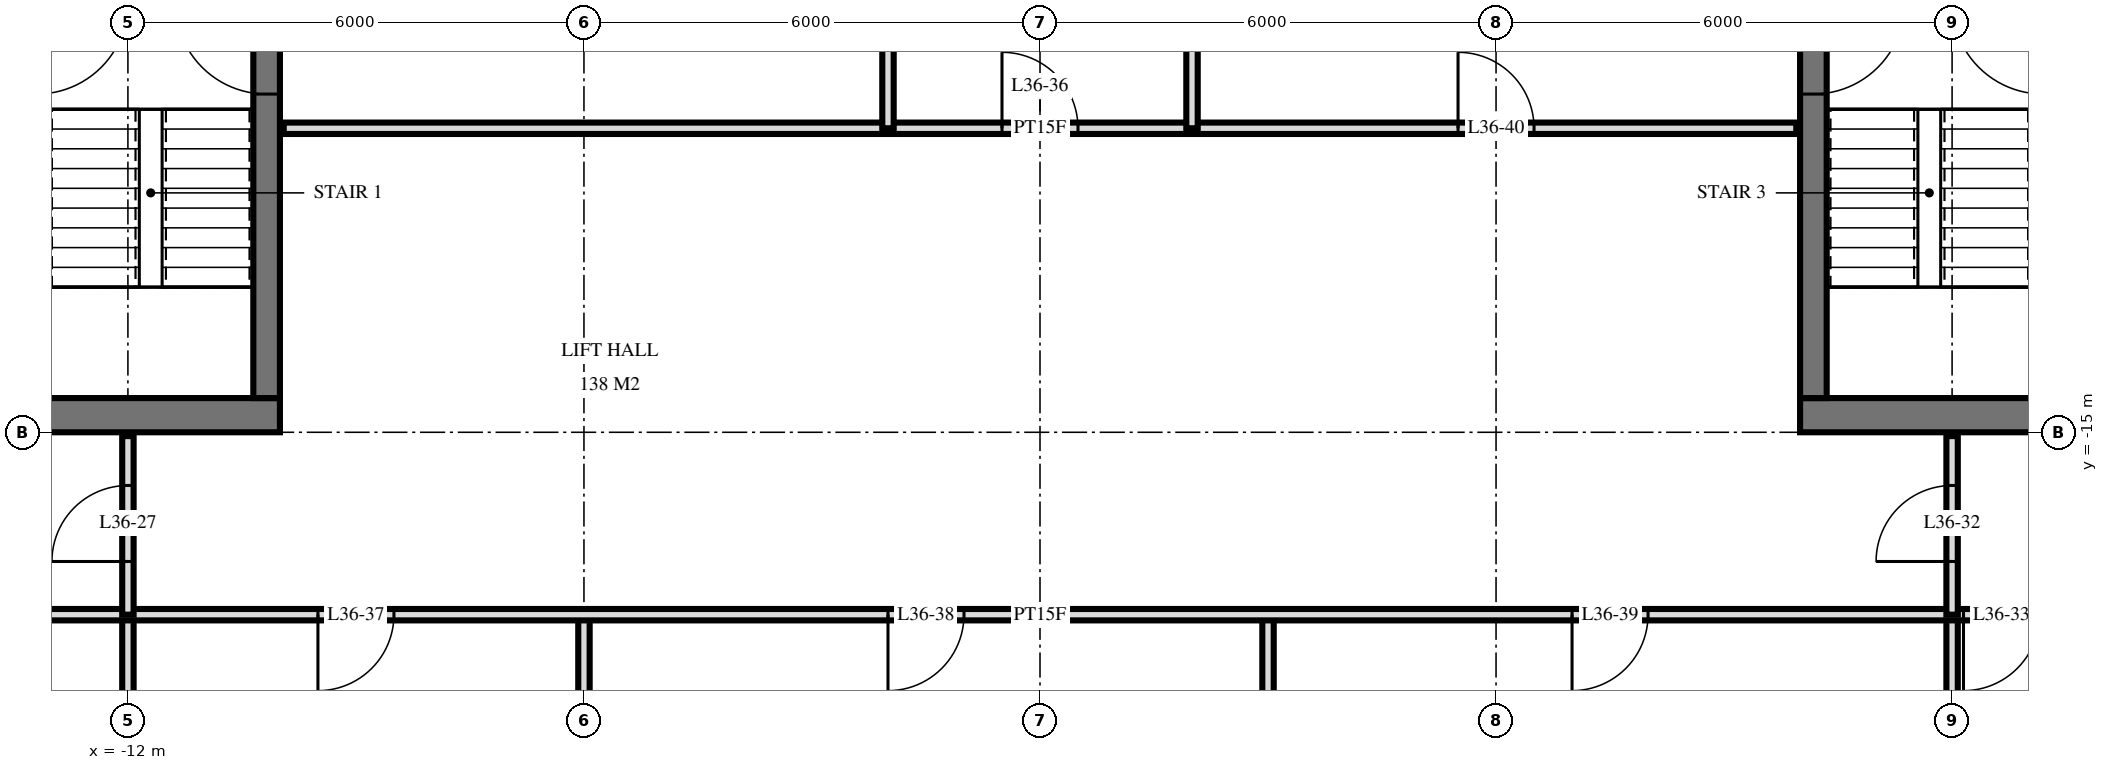
"""IFC4 building model, lengths in metres.
Left out: names, types, materials, properties, quantities, classifications, styles, units other than length and angle.
Written with IfcOpenShell. Run it as: python <this file> out.ifc"""

import sys

from ifc_helpers import new_model, si_unit, direction, frame, frame_2d, origin, place, context, subcontext, project, spatial, rectangle, extrude, element, fill, save


model = new_model("IFC4")
c1 = context("Model", 3, precision=1e-05, world=origin(), true_north=direction((0.0, 1.0)))
c2 = subcontext(c1, "Body", "Model", "MODEL_VIEW")
j1 = project(units=[si_unit("LENGTHUNIT", "METRE"), si_unit("PLANEANGLEUNIT", "RADIAN")], contexts=[c1])
p1 = place(None, origin())
s1 = spatial("IfcSite", under=j1, at=p1, CompositionType="ELEMENT")
p2 = place(p1, origin())
s2 = spatial("IfcBuilding", under=s1, at=p2, CompositionType="ELEMENT")
p3 = place(p2, frame((0.0, 0.0, 141.6)))
s3 = spatial("IfcBuildingStorey", under=s2, at=p3, CompositionType="ELEMENT", Elevation=141.6)
p4 = place(p3, frame((-24.5, -14.775, 0.0), z_axis=(0.0, 0.0, 1.0), x_axis=(1.0, 0.0, 0.0)))
e1 = element("IfcWall", 1, at=p4, inside=s3, PredefinedType="SHEAR", context=c2, shape_type="SweptSolid", body=[
    extrude(rectangle(XDim=14.5, YDim=0.45, at=frame_2d((7.25, 0.0))), origin(), (0.0, 0.0, 1.0), 3.6),
])
p5 = place(p4, frame((6.2, 0.0, 0.0)))
e2 = element("IfcOpeningElement", 2, at=p5, cuts=e1, PredefinedType="OPENING", context=c2, shape_type="SweptSolid", body=[
    extrude(rectangle(XDim=1.2, YDim=2.1, at=frame_2d((0.6, 1.05))), frame((0.0, 0.235, 0.0), z_axis=(0.0, -1.0, 0.0), x_axis=(1.0, 0.0, 0.0)), (0.0, 0.0, 1.0), 0.47),
])
p6 = place(p4, frame((9.25, 0.0, 0.0)))
e3 = element("IfcOpeningElement", 3, at=p6, cuts=e1, PredefinedType="OPENING", context=c2, shape_type="SweptSolid", body=[
    extrude(rectangle(XDim=1.1, YDim=2.1, at=frame_2d((0.55, 1.05))), frame((0.0, 0.235, 0.0), z_axis=(0.0, -1.0, 0.0), x_axis=(1.0, 0.0, 0.0)), (0.0, 0.0, 1.0), 0.47),
])
p7 = place(p4, frame((3.5, 0.0, 0.0)))
e4 = element("IfcOpeningElement", 4, at=p7, cuts=e1, PredefinedType="OPENING", context=c2, shape_type="SweptSolid", body=[
    extrude(rectangle(XDim=0.9, YDim=2.1, at=frame_2d((0.45, 1.05))), frame((0.0, 0.235, 0.0), z_axis=(0.0, -1.0, 0.0), x_axis=(1.0, 0.0, 0.0)), (0.0, 0.0, 1.0), 0.47),
])
p8 = place(p4, frame((1.05, 0.0, 0.0)))
e5 = element("IfcOpeningElement", 5, at=p8, cuts=e1, PredefinedType="OPENING", context=c2, shape_type="SweptSolid", body=[
    extrude(rectangle(XDim=1.0, YDim=2.1, at=frame_2d((0.5, 1.05))), frame((0.0, 0.235, 0.0), z_axis=(0.0, -1.0, 0.0), x_axis=(1.0, 0.0, 0.0)), (0.0, 0.0, 1.0), 0.47),
])
p9 = place(p3, frame((-10.175, -14.55, 0.0), z_axis=(0.0, 0.0, 1.0), x_axis=(0.0, 1.0, 0.0)))
e6 = element("IfcWall", 6, at=p9, inside=s3, PredefinedType="SHEAR", context=c2, shape_type="SweptSolid", body=[
    extrude(rectangle(XDim=14.1, YDim=0.35, at=frame_2d((7.05, 0.0))), origin(), (0.0, 0.0, 1.0), 3.6),
])
p10 = place(p9, frame((8.4, 0.0, 0.0)))
e7 = element("IfcOpeningElement", 7, at=p10, cuts=e6, PredefinedType="OPENING", context=c2, shape_type="SweptSolid", body=[
    extrude(rectangle(XDim=1.4, YDim=2.4, at=frame_2d((0.7, 1.2))), frame((0.0, 0.185, 0.0), z_axis=(0.0, -1.0, 0.0), x_axis=(1.0, 0.0, 0.0)), (0.0, 0.0, 1.0), 0.37),
])
p11 = place(p9, frame((10.0, 0.0, 0.0)))
e8 = element("IfcOpeningElement", 8, at=p11, cuts=e6, PredefinedType="OPENING", context=c2, shape_type="SweptSolid", body=[
    extrude(rectangle(XDim=1.4, YDim=2.4, at=frame_2d((0.7, 1.2))), frame((0.0, 0.185, 0.0), z_axis=(0.0, -1.0, 0.0), x_axis=(1.0, 0.0, 0.0)), (0.0, 0.0, 1.0), 0.37),
])
p12 = place(p9, frame((4.0, 0.0, 0.0)))
e9 = element("IfcOpeningElement", 9, at=p12, cuts=e6, PredefinedType="OPENING", context=c2, shape_type="SweptSolid", body=[
    extrude(rectangle(XDim=1.2, YDim=2.1, at=frame_2d((0.6, 1.05))), frame((0.0, 0.185, 0.0), z_axis=(0.0, -1.0, 0.0), x_axis=(1.0, 0.0, 0.0)), (0.0, 0.0, 1.0), 0.37),
])
p13 = place(p3, frame((10.0, -14.775, 0.0), z_axis=(0.0, 0.0, 1.0), x_axis=(1.0, 0.0, 0.0)))
e10 = element("IfcWall", 10, at=p13, inside=s3, PredefinedType="SHEAR", context=c2, shape_type="SweptSolid", body=[
    extrude(rectangle(XDim=14.5, YDim=0.45, at=frame_2d((7.25, 0.0))), origin(), (0.0, 0.0, 1.0), 3.6),
])
p14 = place(p13, frame((7.1, 0.0, 0.0)))
e11 = element("IfcOpeningElement", 11, at=p14, cuts=e10, PredefinedType="OPENING", context=c2, shape_type="SweptSolid", body=[
    extrude(rectangle(XDim=1.2, YDim=2.1, at=frame_2d((0.6, 1.05))), frame((0.0, 0.235, 0.0), z_axis=(0.0, -1.0, 0.0), x_axis=(1.0, 0.0, 0.0)), (0.0, 0.0, 1.0), 0.47),
])
p15 = place(p13, frame((4.15, 0.0, 0.0)))
e12 = element("IfcOpeningElement", 12, at=p15, cuts=e10, PredefinedType="OPENING", context=c2, shape_type="SweptSolid", body=[
    extrude(rectangle(XDim=1.1, YDim=2.1, at=frame_2d((0.55, 1.05))), frame((0.0, 0.235, 0.0), z_axis=(0.0, -1.0, 0.0), x_axis=(1.0, 0.0, 0.0)), (0.0, 0.0, 1.0), 0.47),
])
p16 = place(p13, frame((10.1, 0.0, 0.0)))
e13 = element("IfcOpeningElement", 13, at=p16, cuts=e10, PredefinedType="OPENING", context=c2, shape_type="SweptSolid", body=[
    extrude(rectangle(XDim=0.9, YDim=2.1, at=frame_2d((0.45, 1.05))), frame((0.0, 0.235, 0.0), z_axis=(0.0, -1.0, 0.0), x_axis=(1.0, 0.0, 0.0)), (0.0, 0.0, 1.0), 0.47),
])
p17 = place(p13, frame((12.45, 0.0, 0.0)))
e14 = element("IfcOpeningElement", 14, at=p17, cuts=e10, PredefinedType="OPENING", context=c2, shape_type="SweptSolid", body=[
    extrude(rectangle(XDim=1.0, YDim=2.1, at=frame_2d((0.5, 1.05))), frame((0.0, 0.235, 0.0), z_axis=(0.0, -1.0, 0.0), x_axis=(1.0, 0.0, 0.0)), (0.0, 0.0, 1.0), 0.47),
])
p18 = place(p3, frame((10.175, -14.55, 0.0), z_axis=(0.0, 0.0, 1.0), x_axis=(0.0, 1.0, 0.0)))
e15 = element("IfcWall", 15, at=p18, inside=s3, PredefinedType="SHEAR", context=c2, shape_type="SweptSolid", body=[
    extrude(rectangle(XDim=14.1, YDim=0.35, at=frame_2d((7.05, 0.0))), origin(), (0.0, 0.0, 1.0), 3.6),
])
p19 = place(p18, frame((8.4, 0.0, 0.0)))
e16 = element("IfcOpeningElement", 16, at=p19, cuts=e15, PredefinedType="OPENING", context=c2, shape_type="SweptSolid", body=[
    extrude(rectangle(XDim=1.4, YDim=2.4, at=frame_2d((0.7, 1.2))), frame((0.0, 0.185, 0.0), z_axis=(0.0, -1.0, 0.0), x_axis=(1.0, 0.0, 0.0)), (0.0, 0.0, 1.0), 0.37),
])
p20 = place(p18, frame((10.0, 0.0, 0.0)))
e17 = element("IfcOpeningElement", 17, at=p20, cuts=e15, PredefinedType="OPENING", context=c2, shape_type="SweptSolid", body=[
    extrude(rectangle(XDim=1.4, YDim=2.4, at=frame_2d((0.7, 1.2))), frame((0.0, 0.185, 0.0), z_axis=(0.0, -1.0, 0.0), x_axis=(1.0, 0.0, 0.0)), (0.0, 0.0, 1.0), 0.37),
])
p21 = place(p18, frame((4.0, 0.0, 0.0)))
e18 = element("IfcOpeningElement", 18, at=p21, cuts=e15, PredefinedType="OPENING", context=c2, shape_type="SweptSolid", body=[
    extrude(rectangle(XDim=1.2, YDim=2.1, at=frame_2d((0.6, 1.05))), frame((0.0, 0.185, 0.0), z_axis=(0.0, -1.0, 0.0), x_axis=(1.0, 0.0, 0.0)), (0.0, 0.0, 1.0), 0.37),
])
p22 = place(p3, frame((12.0, -17.4, 0.0), z_axis=(0.0, 0.0, 1.0), x_axis=(0.0, 1.0, 0.0)))
e19 = element("IfcWall", 19, at=p22, inside=s3, PredefinedType="PARTITIONING", context=c2, shape_type="SweptSolid", body=[
    extrude(rectangle(XDim=2.35, YDim=0.15, at=frame_2d((1.175, 0.0))), origin(), (0.0, 0.0, 1.0), 3.32),
])
p23 = place(p22, frame((0.7, 0.0, 0.0)))
e20 = element("IfcOpeningElement", 20, at=p23, cuts=e19, PredefinedType="OPENING", context=c2, shape_type="SweptSolid", body=[
    extrude(rectangle(XDim=1.0, YDim=2.1, at=frame_2d((0.5, 1.05))), frame((0.0, 0.085, 0.0), z_axis=(0.0, -1.0, 0.0), x_axis=(1.0, 0.0, 0.0)), (0.0, 0.0, 1.0), 0.17),
])
for number, where, z_axis, x_axis in (
    (21, (12.0, -33.62, 0.0), (0.0, 0.0, 1.0), (0.0, 1.0, 0.0)),
    (22, (3.0, -33.62, 0.0), (0.0, 0.0, 1.0), (0.0, 1.0, 0.0)),
):
    element("IfcWall", number, at=place(p3, frame(where, z_axis=z_axis, x_axis=x_axis)), inside=s3, PredefinedType="PARTITIONING", context=c2, shape_type="SweptSolid", body=[
        extrude(rectangle(XDim=16.22, YDim=0.15, at=frame_2d((8.11, 0.0))), origin(), (0.0, 0.0, 1.0), 3.32),
    ])
for number, where, z_axis, x_axis in (
    (23, (2.0, -11.0, 0.0), (0.0, 0.0, 1.0), (0.0, 1.0, 0.0)),
    (24, (-2.0, -11.0, 0.0), (0.0, 0.0, 1.0), (0.0, 1.0, 0.0)),
):
    element("IfcWall", number, at=place(p3, frame(where, z_axis=z_axis, x_axis=x_axis)), inside=s3, PredefinedType="PARTITIONING", context=c2, shape_type="SweptSolid", body=[
        extrude(rectangle(XDim=4.0, YDim=0.15, at=frame_2d((2.0, 0.0))), origin(), (0.0, 0.0, 1.0), 3.32),
    ])
p24 = place(p3, frame((-6.0, -33.62, 0.0), z_axis=(0.0, 0.0, 1.0), x_axis=(0.0, 1.0, 0.0)))
e25 = element("IfcWall", 25, at=p24, inside=s3, PredefinedType="PARTITIONING", context=c2, shape_type="SweptSolid", body=[
    extrude(rectangle(XDim=16.22, YDim=0.15, at=frame_2d((8.11, 0.0))), origin(), (0.0, 0.0, 1.0), 3.32),
])
p25 = place(p3, frame((-12.0, -17.4, 0.0), z_axis=(0.0, 0.0, 1.0), x_axis=(0.0, 1.0, 0.0)))
e26 = element("IfcWall", 26, at=p25, inside=s3, PredefinedType="PARTITIONING", context=c2, shape_type="SweptSolid", body=[
    extrude(rectangle(XDim=2.35, YDim=0.15, at=frame_2d((1.175, 0.0))), origin(), (0.0, 0.0, 1.0), 3.32),
])
p26 = place(p25, frame((0.7, 0.0, 0.0)))
e27 = element("IfcOpeningElement", 27, at=p26, cuts=e26, PredefinedType="OPENING", context=c2, shape_type="SweptSolid", body=[
    extrude(rectangle(XDim=1.0, YDim=2.1, at=frame_2d((0.5, 1.05))), frame((0.0, 0.085, 0.0), z_axis=(0.0, -1.0, 0.0), x_axis=(1.0, 0.0, 0.0)), (0.0, 0.0, 1.0), 0.17),
])
p27 = place(p3, frame((-12.0, -33.62, 0.0), z_axis=(0.0, 0.0, 1.0), x_axis=(0.0, 1.0, 0.0)))
e28 = element("IfcWall", 28, at=p27, inside=s3, PredefinedType="PARTITIONING", context=c2, shape_type="SweptSolid", body=[
    extrude(rectangle(XDim=16.22, YDim=0.15, at=frame_2d((8.11, 0.0))), origin(), (0.0, 0.0, 1.0), 3.32),
])
p28 = place(p3, frame((-28.02, -17.4, 0.0), z_axis=(0.0, 0.0, 1.0), x_axis=(1.0, 0.0, 0.0)))
e29 = element("IfcWall", 29, at=p28, inside=s3, PredefinedType="PARTITIONING", context=c2, shape_type="SweptSolid", body=[
    extrude(rectangle(XDim=56.04, YDim=0.15, at=frame_2d((28.02, 0.0))), origin(), (0.0, 0.0, 1.0), 3.32),
])
p29 = place(p28, frame((13.17, 0.0, 0.0)))
e30 = element("IfcOpeningElement", 30, at=p29, cuts=e29, PredefinedType="OPENING", context=c2, shape_type="SweptSolid", body=[
    extrude(rectangle(XDim=1.0, YDim=2.1, at=frame_2d((0.5, 1.05))), frame((0.0, 0.085, 0.0), z_axis=(0.0, -1.0, 0.0), x_axis=(1.0, 0.0, 0.0)), (0.0, 0.0, 1.0), 0.17),
])
p30 = place(p28, frame((11.87, 0.0, 0.0)))
e31 = element("IfcOpeningElement", 31, at=p30, cuts=e29, PredefinedType="OPENING", context=c2, shape_type="SweptSolid", body=[
    extrude(rectangle(XDim=1.0, YDim=2.1, at=frame_2d((0.5, 1.05))), frame((0.0, 0.085, 0.0), z_axis=(0.0, -1.0, 0.0), x_axis=(1.0, 0.0, 0.0)), (0.0, 0.0, 1.0), 0.17),
])
p31 = place(p28, frame((2.32, 0.0, 0.0)))
e32 = element("IfcOpeningElement", 32, at=p31, cuts=e29, PredefinedType="OPENING", context=c2, shape_type="SweptSolid", body=[
    extrude(rectangle(XDim=1.0, YDim=2.1, at=frame_2d((0.5, 1.05))), frame((0.0, 0.085, 0.0), z_axis=(0.0, -1.0, 0.0), x_axis=(1.0, 0.0, 0.0)), (0.0, 0.0, 1.0), 0.17),
])
p32 = place(p28, frame((40.17, 0.0, 0.0)))
e33 = element("IfcOpeningElement", 33, at=p32, cuts=e29, PredefinedType="OPENING", context=c2, shape_type="SweptSolid", body=[
    extrude(rectangle(XDim=1.0, YDim=2.1, at=frame_2d((0.5, 1.05))), frame((0.0, 0.085, 0.0), z_axis=(0.0, -1.0, 0.0), x_axis=(1.0, 0.0, 0.0)), (0.0, 0.0, 1.0), 0.17),
])
p33 = place(p28, frame((51.22, 0.0, 0.0)))
e34 = element("IfcOpeningElement", 34, at=p33, cuts=e29, PredefinedType="OPENING", context=c2, shape_type="SweptSolid", body=[
    extrude(rectangle(XDim=1.0, YDim=2.1, at=frame_2d((0.5, 1.05))), frame((0.0, 0.085, 0.0), z_axis=(0.0, -1.0, 0.0), x_axis=(1.0, 0.0, 0.0)), (0.0, 0.0, 1.0), 0.17),
])
p34 = place(p28, frame((18.52, 0.0, 0.0)))
e35 = element("IfcOpeningElement", 35, at=p34, cuts=e29, PredefinedType="OPENING", context=c2, shape_type="SweptSolid", body=[
    extrude(rectangle(XDim=1.0, YDim=2.1, at=frame_2d((0.5, 1.05))), frame((0.0, 0.085, 0.0), z_axis=(0.0, -1.0, 0.0), x_axis=(1.0, 0.0, 0.0)), (0.0, 0.0, 1.0), 0.17),
])
p35 = place(p28, frame((26.02, 0.0, 0.0)))
e36 = element("IfcOpeningElement", 36, at=p35, cuts=e29, PredefinedType="OPENING", context=c2, shape_type="SweptSolid", body=[
    extrude(rectangle(XDim=1.0, YDim=2.1, at=frame_2d((0.5, 1.05))), frame((0.0, 0.085, 0.0), z_axis=(0.0, -1.0, 0.0), x_axis=(1.0, 0.0, 0.0)), (0.0, 0.0, 1.0), 0.17),
])
p36 = place(p28, frame((35.02, 0.0, 0.0)))
e37 = element("IfcOpeningElement", 37, at=p36, cuts=e29, PredefinedType="OPENING", context=c2, shape_type="SweptSolid", body=[
    extrude(rectangle(XDim=1.0, YDim=2.1, at=frame_2d((0.5, 1.05))), frame((0.0, 0.085, 0.0), z_axis=(0.0, -1.0, 0.0), x_axis=(1.0, 0.0, 0.0)), (0.0, 0.0, 1.0), 0.17),
])
p37 = place(p3, frame((-9.95, -11.0, 0.0), z_axis=(0.0, 0.0, 1.0), x_axis=(1.0, 0.0, 0.0)))
e38 = element("IfcWall", 38, at=p37, inside=s3, PredefinedType="PARTITIONING", context=c2, shape_type="SweptSolid", body=[
    extrude(rectangle(XDim=19.9, YDim=0.15, at=frame_2d((9.95, 0.0))), origin(), (0.0, 0.0, 1.0), 3.32),
])
p38 = place(p37, frame((9.45, 0.0, 0.0)))
e39 = element("IfcOpeningElement", 39, at=p38, cuts=e38, PredefinedType="OPENING", context=c2, shape_type="SweptSolid", body=[
    extrude(rectangle(XDim=1.0, YDim=2.1, at=frame_2d((0.5, 1.05))), frame((0.0, 0.085, 0.0), z_axis=(0.0, -1.0, 0.0), x_axis=(1.0, 0.0, 0.0)), (0.0, 0.0, 1.0), 0.17),
])
p39 = place(p37, frame((15.45, 0.0, 0.0)))
e40 = element("IfcOpeningElement", 40, at=p39, cuts=e38, PredefinedType="OPENING", context=c2, shape_type="SweptSolid", body=[
    extrude(rectangle(XDim=1.0, YDim=2.1, at=frame_2d((0.5, 1.05))), frame((0.0, 0.085, 0.0), z_axis=(0.0, -1.0, 0.0), x_axis=(1.0, 0.0, 0.0)), (0.0, 0.0, 1.0), 0.17),
])
p40 = place(p12, origin())
e41 = element("IfcDoor", 41, at=p40, inside=s3, OperationType="SINGLE_SWING_LEFT", PredefinedType="DOOR", context=c2, shape_type="SweptSolid", body=[
    extrude(rectangle(XDim=1.2, YDim=2.1, at=frame_2d((0.6, 1.05))), frame((0.0, 0.025, 0.0), z_axis=(0.0, -1.0, 0.0), x_axis=(1.0, 0.0, 0.0)), (0.0, 0.0, 1.0), 0.05),
])
fill(e9, e41)
p41 = place(p21, frame((0.6, 0.0, 0.0), z_axis=(0.0, 0.0, 1.0), x_axis=(-1.0, 0.0, 0.0)))
e42 = element("IfcDoor", 42, at=p41, inside=s3, OperationType="SINGLE_SWING_RIGHT", PredefinedType="DOOR", context=c2, shape_type="SweptSolid", body=[
    extrude(rectangle(XDim=1.2, YDim=2.1, at=frame_2d((0.0, 1.05))), frame((0.0, -0.025, 0.0), z_axis=(0.0, 1.0, 0.0), x_axis=(-1.0, 0.0, 0.0)), (0.0, 0.0, 1.0), 0.05),
])
fill(e18, e42)
p42 = place(p26, origin())
e43 = element("IfcDoor", 43, at=p42, inside=s3, OperationType="SINGLE_SWING_RIGHT", PredefinedType="DOOR", context=c2, shape_type="SweptSolid", body=[
    extrude(rectangle(XDim=1.0, YDim=2.1, at=frame_2d((0.5, 1.05))), frame((0.0, 0.025, 0.0), z_axis=(0.0, -1.0, 0.0), x_axis=(1.0, 0.0, 0.0)), (0.0, 0.0, 1.0), 0.05),
])
fill(e27, e43)
p43 = place(p23, origin())
e44 = element("IfcDoor", 44, at=p43, inside=s3, OperationType="SINGLE_SWING_RIGHT", PredefinedType="DOOR", context=c2, shape_type="SweptSolid", body=[
    extrude(rectangle(XDim=1.0, YDim=2.1, at=frame_2d((0.5, 1.05))), frame((0.0, 0.025, 0.0), z_axis=(0.0, -1.0, 0.0), x_axis=(1.0, 0.0, 0.0)), (0.0, 0.0, 1.0), 0.05),
])
fill(e20, e44)
p44 = place(p32, frame((0.5, 0.0, 0.0), z_axis=(0.0, 0.0, 1.0), x_axis=(-1.0, 0.0, 0.0)))
e45 = element("IfcDoor", 45, at=p44, inside=s3, OperationType="SINGLE_SWING_LEFT", PredefinedType="DOOR", context=c2, shape_type="SweptSolid", body=[
    extrude(rectangle(XDim=1.0, YDim=2.1, at=frame_2d((0.0, 1.05))), frame((0.0, -0.025, 0.0), z_axis=(0.0, 1.0, 0.0), x_axis=(-1.0, 0.0, 0.0)), (0.0, 0.0, 1.0), 0.05),
])
fill(e33, e45)
p45 = place(p38, origin())
e46 = element("IfcDoor", 46, at=p45, inside=s3, OperationType="SINGLE_SWING_RIGHT", PredefinedType="DOOR", context=c2, shape_type="SweptSolid", body=[
    extrude(rectangle(XDim=1.0, YDim=2.1, at=frame_2d((0.5, 1.05))), frame((0.0, 0.025, 0.0), z_axis=(0.0, -1.0, 0.0), x_axis=(1.0, 0.0, 0.0)), (0.0, 0.0, 1.0), 0.05),
])
fill(e39, e46)
p46 = place(p34, frame((0.5, 0.0, 0.0), z_axis=(0.0, 0.0, 1.0), x_axis=(-1.0, 0.0, 0.0)))
e47 = element("IfcDoor", 47, at=p46, inside=s3, OperationType="SINGLE_SWING_LEFT", PredefinedType="DOOR", context=c2, shape_type="SweptSolid", body=[
    extrude(rectangle(XDim=1.0, YDim=2.1, at=frame_2d((0.0, 1.05))), frame((0.0, -0.025, 0.0), z_axis=(0.0, 1.0, 0.0), x_axis=(-1.0, 0.0, 0.0)), (0.0, 0.0, 1.0), 0.05),
])
fill(e35, e47)
p47 = place(p35, frame((0.5, 0.0, 0.0), z_axis=(0.0, 0.0, 1.0), x_axis=(-1.0, 0.0, 0.0)))
e48 = element("IfcDoor", 48, at=p47, inside=s3, OperationType="SINGLE_SWING_LEFT", PredefinedType="DOOR", context=c2, shape_type="SweptSolid", body=[
    extrude(rectangle(XDim=1.0, YDim=2.1, at=frame_2d((0.0, 1.05))), frame((0.0, -0.025, 0.0), z_axis=(0.0, 1.0, 0.0), x_axis=(-1.0, 0.0, 0.0)), (0.0, 0.0, 1.0), 0.05),
])
fill(e36, e48)
p48 = place(p36, frame((0.5, 0.0, 0.0), z_axis=(0.0, 0.0, 1.0), x_axis=(-1.0, 0.0, 0.0)))
e49 = element("IfcDoor", 49, at=p48, inside=s3, OperationType="SINGLE_SWING_LEFT", PredefinedType="DOOR", context=c2, shape_type="SweptSolid", body=[
    extrude(rectangle(XDim=1.0, YDim=2.1, at=frame_2d((0.0, 1.05))), frame((0.0, -0.025, 0.0), z_axis=(0.0, 1.0, 0.0), x_axis=(-1.0, 0.0, 0.0)), (0.0, 0.0, 1.0), 0.05),
])
fill(e37, e49)
p49 = place(p39, origin())
e50 = element("IfcDoor", 50, at=p49, inside=s3, OperationType="SINGLE_SWING_RIGHT", PredefinedType="DOOR", context=c2, shape_type="SweptSolid", body=[
    extrude(rectangle(XDim=1.0, YDim=2.1, at=frame_2d((0.5, 1.05))), frame((0.0, 0.025, 0.0), z_axis=(0.0, -1.0, 0.0), x_axis=(1.0, 0.0, 0.0)), (0.0, 0.0, 1.0), 0.05),
])
fill(e40, e50)
save(model, sys.argv[1])
